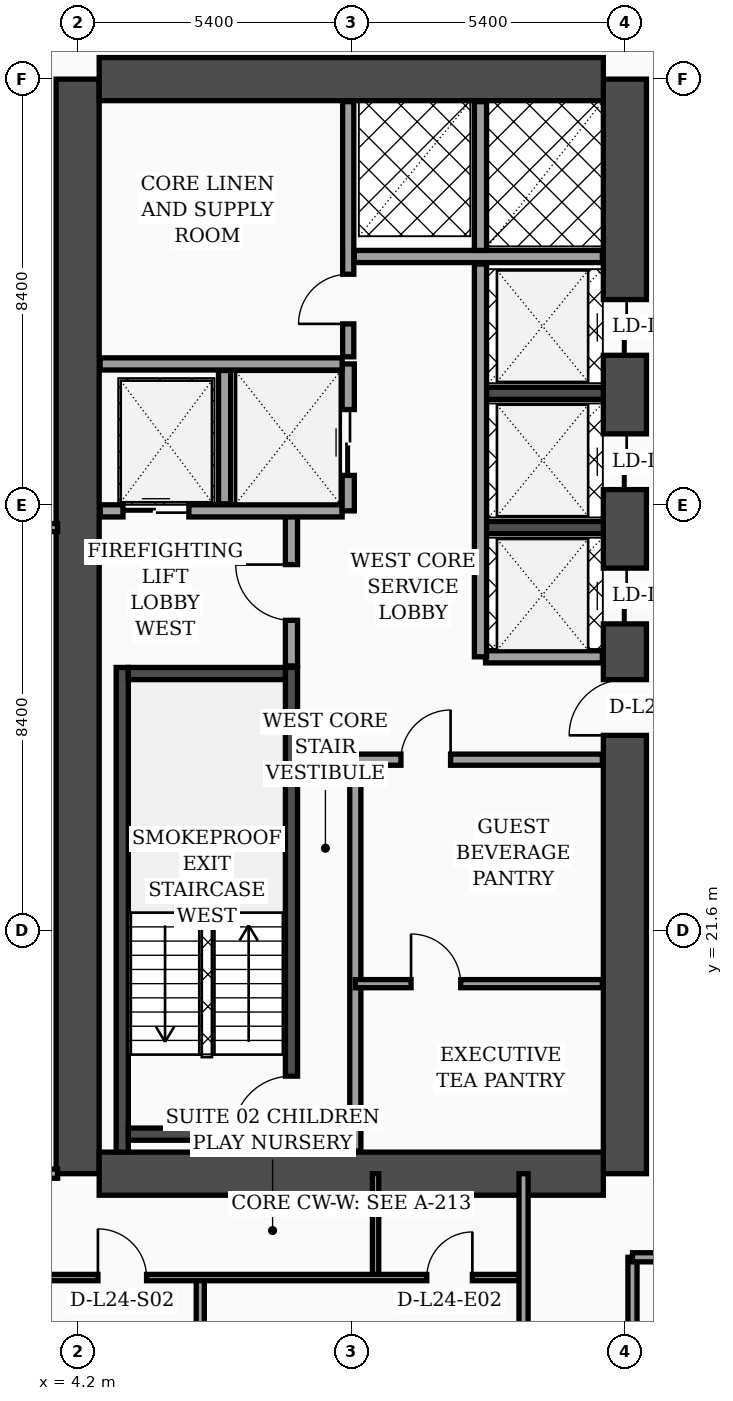
"""IFC4 building model, lengths in metres.
Left out: names, types, materials, properties, quantities, classifications, styles, units other than length and angle.
Written with IfcOpenShell. Run it as: python <this file> out.ifc"""

import sys

from ifc_helpers import new_model, si_unit, direction, frame, frame_2d, origin, place, context, subcontext, project, spatial, rectangle, extrude, element, fill, save


model = new_model("IFC4")
c1 = context("Model", 3, precision=1e-05, world=origin(), true_north=direction((0.0, 1.0)))
c2 = subcontext(c1, "Body", "Model", "MODEL_VIEW")
j1 = project(units=[si_unit("LENGTHUNIT", "METRE"), si_unit("PLANEANGLEUNIT", "RADIAN")], contexts=[c1])
p1 = place(None, origin())
s1 = spatial("IfcSite", under=j1, at=p1, CompositionType="ELEMENT")
p2 = place(p1, origin())
s2 = spatial("IfcBuilding", under=s1, at=p2, CompositionType="ELEMENT")
p3 = place(p2, frame((0.0, 0.0, 101.2)))
s3 = spatial("IfcBuildingStorey", under=s2, at=p3, CompositionType="ELEMENT", Elevation=101.2)
p4 = place(p3, frame((4.2, 16.8, 0.0), z_axis=(0.0, 0.0, 1.0), x_axis=(0.0, 1.0, 0.0)))
e1 = element("IfcWall", 1, at=p4, inside=s3, PredefinedType="SHEAR", context=c2, shape_type="SweptSolid", body=[
    extrude(rectangle(XDim=21.6, YDim=0.85, at=frame_2d((10.8, 0.0))), origin(), (0.0, 0.0, 1.0), 3.56),
])
p5 = place(p3, frame((15.0, 16.8, 0.0), z_axis=(0.0, 0.0, 1.0), x_axis=(0.0, 1.0, 0.0)))
e2 = element("IfcWall", 2, at=p5, inside=s3, PredefinedType="SHEAR", context=c2, shape_type="SweptSolid", body=[
    extrude(rectangle(XDim=21.6, YDim=0.85, at=frame_2d((10.8, 0.0))), origin(), (0.0, 0.0, 1.0), 3.56),
])
p6 = place(p5, frame((8.65, 0.0, 0.0)))
e3 = element("IfcOpeningElement", 3, at=p6, cuts=e2, PredefinedType="OPENING", context=c2, shape_type="SweptSolid", body=[
    extrude(rectangle(XDim=1.1, YDim=2.2, at=frame_2d((0.55, 1.1))), frame((0.0, 0.435, 0.0), z_axis=(0.0, -1.0, 0.0), x_axis=(1.0, 0.0, 0.0)), (0.0, 0.0, 1.0), 0.87),
])
p7 = place(p5, frame((10.85, 0.0, 0.0)))
e4 = element("IfcOpeningElement", 4, at=p7, cuts=e2, PredefinedType="OPENING", context=c2, shape_type="SweptSolid", body=[
    extrude(rectangle(XDim=1.1, YDim=2.2, at=frame_2d((0.55, 1.1))), frame((0.0, 0.435, 0.0), z_axis=(0.0, -1.0, 0.0), x_axis=(1.0, 0.0, 0.0)), (0.0, 0.0, 1.0), 0.87),
])
p8 = place(p5, frame((13.5, 0.0, 0.0)))
e5 = element("IfcOpeningElement", 5, at=p8, cuts=e2, PredefinedType="OPENING", context=c2, shape_type="SweptSolid", body=[
    extrude(rectangle(XDim=1.1, YDim=2.2, at=frame_2d((0.55, 1.1))), frame((0.0, 0.435, 0.0), z_axis=(0.0, -1.0, 0.0), x_axis=(1.0, 0.0, 0.0)), (0.0, 0.0, 1.0), 0.87),
])
p9 = place(p5, frame((16.15, 0.0, 0.0)))
e6 = element("IfcOpeningElement", 6, at=p9, cuts=e2, PredefinedType="OPENING", context=c2, shape_type="SweptSolid", body=[
    extrude(rectangle(XDim=1.1, YDim=2.2, at=frame_2d((0.55, 1.1))), frame((0.0, 0.435, 0.0), z_axis=(0.0, -1.0, 0.0), x_axis=(1.0, 0.0, 0.0)), (0.0, 0.0, 1.0), 0.87),
])
for number, where, z_axis, x_axis in (
    (7, (4.625, 38.4, 0.0), (0.0, 0.0, 1.0), (1.0, 0.0, 0.0)),
    (8, (4.625, 16.8, 0.0), (0.0, 0.0, 1.0), (1.0, 0.0, 0.0)),
):
    element("IfcWall", number, at=place(p3, frame(where, z_axis=z_axis, x_axis=x_axis)), inside=s3, PredefinedType="SHEAR", context=c2, shape_type="SweptSolid", body=[
        extrude(rectangle(XDim=9.95, YDim=0.85, at=frame_2d((4.975, 0.0))), origin(), (0.0, 0.0, 1.0), 3.56),
    ])
p10 = place(p3, frame((5.08, 17.225, 0.0), z_axis=(0.0, 0.0, 1.0), x_axis=(0.0, 1.0, 0.0)))
e9 = element("IfcWall", 9, at=p10, inside=s3, PredefinedType="SOLIDWALL", context=c2, shape_type="SweptSolid", body=[
    extrude(rectangle(XDim=9.565, YDim=0.24, at=frame_2d((4.782, 0.0))), origin(), (0.0, 0.0, 1.0), 3.56),
])
p11 = place(p3, frame((8.42, 17.225, 0.0), z_axis=(0.0, 0.0, 1.0), x_axis=(0.0, 1.0, 0.0)))
e10 = element("IfcWall", 10, at=p11, inside=s3, PredefinedType="SOLIDWALL", context=c2, shape_type="SweptSolid", body=[
    extrude(rectangle(XDim=9.565, YDim=0.24, at=frame_2d((4.782, 0.0))), origin(), (0.0, 0.0, 1.0), 3.56),
])
p12 = place(p11, frame((0.35, 0.0, 0.0)))
e11 = element("IfcOpeningElement", 11, at=p12, cuts=e10, PredefinedType="OPENING", context=c2, shape_type="SweptSolid", body=[
    extrude(rectangle(XDim=1.15, YDim=2.2, at=frame_2d((0.575, 1.1))), frame((0.0, 0.13, 0.0), z_axis=(0.0, -1.0, 0.0), x_axis=(1.0, 0.0, 0.0)), (0.0, 0.0, 1.0), 0.26),
])
for number, where, z_axis, x_axis in (
    (12, (5.2, 17.58, 0.0), (0.0, 0.0, 1.0), (1.0, 0.0, 0.0)),
    (13, (5.2, 26.67, 0.0), (0.0, 0.0, 1.0), (1.0, 0.0, 0.0)),
):
    element("IfcWall", number, at=place(p3, frame(where, z_axis=z_axis, x_axis=x_axis)), inside=s3, PredefinedType="SOLIDWALL", context=c2, shape_type="SweptSolid", body=[
        extrude(rectangle(XDim=3.1, YDim=0.24, at=frame_2d((1.55, 0.0))), origin(), (0.0, 0.0, 1.0), 3.56),
    ])
for number, where, z_axis, x_axis in (
    (14, (12.18, 29.55, 0.0), (0.0, 0.0, 1.0), (1.0, 0.0, 0.0)),
    (15, (12.18, 32.2, 0.0), (0.0, 0.0, 1.0), (1.0, 0.0, 0.0)),
):
    element("IfcWall", number, at=place(p3, frame(where, z_axis=z_axis, x_axis=x_axis)), inside=s3, PredefinedType="SOLIDWALL", context=c2, shape_type="SweptSolid", body=[
        extrude(rectangle(XDim=2.395, YDim=0.24, at=frame_2d((1.198, 0.0))), origin(), (0.0, 0.0, 1.0), 3.56),
    ])
p13 = place(p3, frame((8.42, 26.82, 0.0), z_axis=(0.0, 0.0, 1.0), x_axis=(0.0, 1.0, 0.0)))
e16 = element("IfcWall", 16, at=p13, inside=s3, PredefinedType="SOLIDWALL", context=c2, shape_type="SweptSolid", body=[
    extrude(rectangle(XDim=3.0, YDim=0.24, at=frame_2d((1.5, 0.0))), origin(), (0.0, 0.0, 1.0), 3.56),
])
p14 = place(p13, frame((0.9, 0.0, 0.0)))
e17 = element("IfcOpeningElement", 17, at=p14, cuts=e16, PredefinedType="OPENING", context=c2, shape_type="SweptSolid", body=[
    extrude(rectangle(XDim=1.1, YDim=2.2, at=frame_2d((0.55, 1.1))), frame((0.0, 0.13, 0.0), z_axis=(0.0, -1.0, 0.0), x_axis=(1.0, 0.0, 0.0)), (0.0, 0.0, 1.0), 0.26),
])
p15 = place(p3, frame((4.645, 29.88, 0.0), z_axis=(0.0, 0.0, 1.0), x_axis=(1.0, 0.0, 0.0)))
e18 = element("IfcWall", 18, at=p15, inside=s3, PredefinedType="SOLIDWALL", context=c2, shape_type="SweptSolid", body=[
    extrude(rectangle(XDim=4.775, YDim=0.24, at=frame_2d((2.387, 0.0))), origin(), (0.0, 0.0, 1.0), 3.56),
])
p16 = place(p15, frame((0.45, 0.0, 0.0)))
e19 = element("IfcOpeningElement", 19, at=p16, cuts=e18, PredefinedType="OPENING", context=c2, shape_type="SweptSolid", body=[
    extrude(rectangle(XDim=1.3, YDim=2.35, at=frame_2d((0.65, 1.175))), frame((0.0, 0.13, 0.0), z_axis=(0.0, -1.0, 0.0), x_axis=(1.0, 0.0, 0.0)), (0.0, 0.0, 1.0), 0.26),
])
p17 = place(p3, frame((7.1, 30.02, 0.0), z_axis=(0.0, 0.0, 1.0), x_axis=(0.0, 1.0, 0.0)))
e20 = element("IfcWall", 20, at=p17, inside=s3, PredefinedType="SOLIDWALL", context=c2, shape_type="SweptSolid", body=[
    extrude(rectangle(XDim=2.63, YDim=0.24, at=frame_2d((1.315, 0.0))), origin(), (0.0, 0.0, 1.0), 3.56),
])
p18 = place(p3, frame((9.54, 29.88, 0.0), z_axis=(0.0, 0.0, 1.0), x_axis=(0.0, 1.0, 0.0)))
e21 = element("IfcWall", 21, at=p18, inside=s3, PredefinedType="SOLIDWALL", context=c2, shape_type="SweptSolid", body=[
    extrude(rectangle(XDim=2.9, YDim=0.24, at=frame_2d((1.45, 0.0))), origin(), (0.0, 0.0, 1.0), 3.56),
])
p19 = place(p18, frame((0.7, 0.0, 0.0)))
e22 = element("IfcOpeningElement", 22, at=p19, cuts=e21, PredefinedType="OPENING", context=c2, shape_type="SweptSolid", body=[
    extrude(rectangle(XDim=1.3, YDim=2.35, at=frame_2d((0.65, 1.175))), frame((0.0, 0.13, 0.0), z_axis=(0.0, -1.0, 0.0), x_axis=(1.0, 0.0, 0.0)), (0.0, 0.0, 1.0), 0.26),
])
p20 = place(p3, frame((4.645, 32.78, 0.0), z_axis=(0.0, 0.0, 1.0), x_axis=(1.0, 0.0, 0.0)))
e23 = element("IfcWall", 23, at=p20, inside=s3, PredefinedType="SOLIDWALL", context=c2, shape_type="SweptSolid", body=[
    extrude(rectangle(XDim=4.775, YDim=0.24, at=frame_2d((2.387, 0.0))), origin(), (0.0, 0.0, 1.0), 3.19),
])
p21 = place(p3, frame((9.68, 17.245, 0.0), z_axis=(0.0, 0.0, 1.0), x_axis=(0.0, 1.0, 0.0)))
e24 = element("IfcWall", 24, at=p21, inside=s3, PredefinedType="SOLIDWALL", context=c2, shape_type="SweptSolid", body=[
    extrude(rectangle(XDim=7.755, YDim=0.22, at=frame_2d((3.877, 0.0))), origin(), (0.0, 0.0, 1.0), 3.56),
])
p22 = place(p3, frame((9.54, 32.92, 0.0), z_axis=(0.0, 0.0, 1.0), x_axis=(0.0, 1.0, 0.0)))
e25 = element("IfcWall", 25, at=p22, inside=s3, PredefinedType="SOLIDWALL", context=c2, shape_type="SweptSolid", body=[
    extrude(rectangle(XDim=5.035, YDim=0.22, at=frame_2d((2.518, 0.0))), origin(), (0.0, 0.0, 1.0), 3.56),
])
p23 = place(p22, frame((0.65, 0.0, 0.0)))
e26 = element("IfcOpeningElement", 26, at=p23, cuts=e25, PredefinedType="OPENING", context=c2, shape_type="SweptSolid", body=[
    extrude(rectangle(XDim=0.98, YDim=2.15, at=frame_2d((0.49, 1.075))), frame((0.0, 0.12, 0.0), z_axis=(0.0, -1.0, 0.0), x_axis=(1.0, 0.0, 0.0)), (0.0, 0.0, 1.0), 0.24),
])
p24 = place(p3, frame((9.68, 20.55, 0.0), z_axis=(0.0, 0.0, 1.0), x_axis=(1.0, 0.0, 0.0)))
e27 = element("IfcWall", 27, at=p24, inside=s3, PredefinedType="PARTITIONING", context=c2, shape_type="SweptSolid", body=[
    extrude(rectangle(XDim=4.875, YDim=0.16, at=frame_2d((2.438, 0.0))), origin(), (0.0, 0.0, 1.0), 3.56),
])
p25 = place(p24, frame((1.1, 0.0, 0.0)))
e28 = element("IfcOpeningElement", 28, at=p25, cuts=e27, PredefinedType="OPENING", context=c2, shape_type="SweptSolid", body=[
    extrude(rectangle(XDim=0.98, YDim=2.15, at=frame_2d((0.49, 1.075))), frame((0.0, 0.09, 0.0), z_axis=(0.0, -1.0, 0.0), x_axis=(1.0, 0.0, 0.0)), (0.0, 0.0, 1.0), 0.18),
])
p26 = place(p3, frame((9.68, 24.97, 0.0), z_axis=(0.0, 0.0, 1.0), x_axis=(1.0, 0.0, 0.0)))
e29 = element("IfcWall", 29, at=p26, inside=s3, PredefinedType="SOLIDWALL", context=c2, shape_type="SweptSolid", body=[
    extrude(rectangle(XDim=4.875, YDim=0.22, at=frame_2d((2.438, 0.0))), origin(), (0.0, 0.0, 1.0), 2.84),
])
p27 = place(p26, frame((0.9, 0.0, 0.0)))
e30 = element("IfcOpeningElement", 30, at=p27, cuts=e29, PredefinedType="OPENING", context=c2, shape_type="SweptSolid", body=[
    extrude(rectangle(XDim=0.98, YDim=2.15, at=frame_2d((0.49, 1.075))), frame((0.0, 0.12, 0.0), z_axis=(0.0, -1.0, 0.0), x_axis=(1.0, 0.0, 0.0)), (0.0, 0.0, 1.0), 0.24),
])
p28 = place(p3, frame((12.25, 27.0, 0.0), z_axis=(0.0, 0.0, 1.0), x_axis=(1.0, 0.0, 0.0)))
e31 = element("IfcWall", 31, at=p28, inside=s3, PredefinedType="SOLIDWALL", context=c2, shape_type="SweptSolid", body=[
    extrude(rectangle(XDim=2.305, YDim=0.24, at=frame_2d((1.152, 0.0))), origin(), (0.0, 0.0, 1.0), 3.56),
])
p29 = place(p3, frame((12.15, 27.0, 0.0), z_axis=(0.0, 0.0, 1.0), x_axis=(0.0, 1.0, 0.0)))
e32 = element("IfcWall", 32, at=p29, inside=s3, PredefinedType="SOLIDWALL", context=c2, shape_type="SweptSolid", body=[
    extrude(rectangle(XDim=7.75, YDim=0.24, at=frame_2d((3.875, 0.0))), origin(), (0.0, 0.0, 1.0), 3.56),
])
p30 = place(p3, frame((9.66, 34.9, 0.0), z_axis=(0.0, 0.0, 1.0), x_axis=(1.0, 0.0, 0.0)))
e33 = element("IfcWall", 33, at=p30, inside=s3, PredefinedType="SOLIDWALL", context=c2, shape_type="SweptSolid", body=[
    extrude(rectangle(XDim=4.895, YDim=0.24, at=frame_2d((2.448, 0.0))), origin(), (0.0, 0.0, 1.0), 3.56),
])
p31 = place(p3, frame((12.15, 35.02, 0.0), z_axis=(0.0, 0.0, 1.0), x_axis=(0.0, 1.0, 0.0)))
e34 = element("IfcWall", 34, at=p31, inside=s3, PredefinedType="SOLIDWALL", context=c2, shape_type="SweptSolid", body=[
    extrude(rectangle(XDim=2.935, YDim=0.24, at=frame_2d((1.468, 0.0))), origin(), (0.0, 0.0, 1.0), 3.56),
])
p32 = place(p3, frame((0.08, 29.55, 0.0), z_axis=(0.0, 0.0, 1.0), x_axis=(1.0, 0.0, 0.0)))
e35 = element("IfcWall", 35, at=p32, inside=s3, PredefinedType="PARTITIONING", context=c2, shape_type="SweptSolid", body=[
    extrude(rectangle(XDim=3.725, YDim=0.16, at=frame_2d((1.862, 0.0))), origin(), (0.0, 0.0, 1.0), 3.04),
])
p33 = place(p32, frame((1.35, 0.0, 0.0)))
e36 = element("IfcOpeningElement", 36, at=p33, cuts=e35, PredefinedType="OPENING", context=c2, shape_type="SweptSolid", body=[
    extrude(rectangle(XDim=0.96, YDim=2.2, at=frame_2d((0.48, 1.1))), frame((0.0, 0.09, 0.0), z_axis=(0.0, -1.0, 0.0), x_axis=(1.0, 0.0, 0.0)), (0.0, 0.0, 1.0), 0.18),
])
p34 = place(p3, frame((0.08, 16.8, 0.0), z_axis=(0.0, 0.0, 1.0), x_axis=(1.0, 0.0, 0.0)))
e37 = element("IfcWall", 37, at=p34, inside=s3, PredefinedType="PARTITIONING", context=c2, shape_type="SweptSolid", body=[
    extrude(rectangle(XDim=3.725, YDim=0.18, at=frame_2d((1.862, 0.0))), origin(), (0.0, 0.0, 1.0), 2.84),
])
p35 = place(p3, frame((10.08, 14.75, 0.0), z_axis=(0.0, 0.0, 1.0), x_axis=(0.0, 1.0, 0.0)))
e38 = element("IfcWall", 38, at=p35, inside=s3, PredefinedType="PARTITIONING", context=c2, shape_type="SweptSolid", body=[
    extrude(rectangle(XDim=2.05, YDim=0.125, at=frame_2d((1.025, 0.0))), origin(), (0.0, 0.0, 1.0), 3.56),
])
p36 = place(p3, frame((6.62, 9.5, 0.0), z_axis=(0.0, 0.0, 1.0), x_axis=(0.0, 1.0, 0.0)))
e39 = element("IfcWall", 39, at=p36, inside=s3, PredefinedType="PARTITIONING", context=c2, shape_type="SweptSolid", body=[
    extrude(rectangle(XDim=5.25, YDim=0.16, at=frame_2d((2.625, 0.0))), origin(), (0.0, 0.0, 1.0), 3.14),
])
p37 = place(p36, frame((2.15, 0.0, 0.0)))
e40 = element("IfcOpeningElement", 40, at=p37, cuts=e39, PredefinedType="OPENING", context=c2, shape_type="SweptSolid", body=[
    extrude(rectangle(XDim=0.96, YDim=2.2, at=frame_2d((0.48, 1.1))), frame((0.0, 0.09, 0.0), z_axis=(0.0, -1.0, 0.0), x_axis=(1.0, 0.0, 0.0)), (0.0, 0.0, 1.0), 0.18),
])
p38 = place(p3, frame((0.08, 14.75, 0.0), z_axis=(0.0, 0.0, 1.0), x_axis=(1.0, 0.0, 0.0)))
e41 = element("IfcWall", 41, at=p38, inside=s3, PredefinedType="PARTITIONING", context=c2, shape_type="SweptSolid", body=[
    extrude(rectangle(XDim=12.92, YDim=0.125, at=frame_2d((6.46, 0.0))), origin(), (0.0, 0.0, 1.0), 2.84),
])
p39 = place(p38, frame((4.52, 0.0, 0.0)))
e42 = element("IfcOpeningElement", 42, at=p39, cuts=e41, PredefinedType="OPENING", context=c2, shape_type="SweptSolid", body=[
    extrude(rectangle(XDim=0.96, YDim=2.2, at=frame_2d((0.48, 1.1))), frame((0.0, 0.073, 0.0), z_axis=(0.0, -1.0, 0.0), x_axis=(1.0, 0.0, 0.0)), (0.0, 0.0, 1.0), 0.145),
])
p40 = place(p38, frame((11.01, 0.0, 0.0)))
e43 = element("IfcOpeningElement", 43, at=p40, cuts=e41, PredefinedType="OPENING", context=c2, shape_type="SweptSolid", body=[
    extrude(rectangle(XDim=0.9, YDim=2.15, at=frame_2d((0.45, 1.075))), frame((0.0, 0.073, 0.0), z_axis=(0.0, -1.0, 0.0), x_axis=(1.0, 0.0, 0.0)), (0.0, 0.0, 1.0), 0.145),
])
p41 = place(p3, frame((13.0, 2.44, 0.0), z_axis=(0.0, 0.0, 1.0), x_axis=(0.0, 1.0, 0.0)))
e44 = element("IfcWall", 44, at=p41, inside=s3, PredefinedType="PARTITIONING", context=c2, shape_type="SweptSolid", body=[
    extrude(rectangle(XDim=14.36, YDim=0.18, at=frame_2d((7.18, 0.0))), origin(), (0.0, 0.0, 1.0), 2.84),
])
p42 = place(p41, frame((3.01, 0.0, 0.0)))
e45 = element("IfcOpeningElement", 45, at=p42, cuts=e44, PredefinedType="OPENING", context=c2, shape_type="SweptSolid", body=[
    extrude(rectangle(XDim=1.02, YDim=2.2, at=frame_2d((0.51, 1.1))), frame((0.0, 0.1, 0.0), z_axis=(0.0, -1.0, 0.0), x_axis=(1.0, 0.0, 0.0)), (0.0, 0.0, 1.0), 0.2),
])
p43 = place(p41, frame((9.18, 0.0, 0.0)))
e46 = element("IfcOpeningElement", 46, at=p43, cuts=e44, PredefinedType="OPENING", context=c2, shape_type="SweptSolid", body=[
    extrude(rectangle(XDim=1.02, YDim=2.2, at=frame_2d((0.51, 1.1))), frame((0.0, 0.1, 0.0), z_axis=(0.0, -1.0, 0.0), x_axis=(1.0, 0.0, 0.0)), (0.0, 0.0, 1.0), 0.2),
])
p44 = place(p3, frame((15.15, 2.44, 0.0), z_axis=(0.0, 0.0, 1.0), x_axis=(0.0, 1.0, 0.0)))
e47 = element("IfcWall", 47, at=p44, inside=s3, PredefinedType="PARTITIONING", context=c2, shape_type="SweptSolid", body=[
    extrude(rectangle(XDim=12.71, YDim=0.18, at=frame_2d((6.355, 0.0))), origin(), (0.0, 0.0, 1.0), 3.04),
])
p45 = place(p3, frame((15.15, 15.15, 0.0), z_axis=(0.0, 0.0, 1.0), x_axis=(1.0, 0.0, 0.0)))
e48 = element("IfcWall", 48, at=p45, inside=s3, PredefinedType="PARTITIONING", context=c2, shape_type="SweptSolid", body=[
    extrude(rectangle(XDim=6.45, YDim=0.18, at=frame_2d((3.225, 0.0))), origin(), (0.0, 0.0, 1.0), 2.49),
])
p46 = place(p45, frame((1.74, 0.0, 0.0)))
e49 = element("IfcOpeningElement", 49, at=p46, cuts=e48, PredefinedType="OPENING", context=c2, shape_type="SweptSolid", body=[
    extrude(rectangle(XDim=1.02, YDim=2.2, at=frame_2d((0.51, 1.1))), frame((0.0, 0.1, 0.0), z_axis=(0.0, -1.0, 0.0), x_axis=(1.0, 0.0, 0.0)), (0.0, 0.0, 1.0), 0.2),
])
p47 = place(p14, origin())
e50 = element("IfcDoor", 50, at=p47, inside=s3, OperationType="SINGLE_SWING_RIGHT", PredefinedType="DOOR", context=c2, shape_type="SweptSolid", body=[
    extrude(rectangle(XDim=1.1, YDim=2.2, at=frame_2d((0.55, 1.1))), frame((0.0, 0.025, 0.0), z_axis=(0.0, -1.0, 0.0), x_axis=(1.0, 0.0, 0.0)), (0.0, 0.0, 1.0), 0.05),
])
fill(e17, e50)
p48 = place(p16, origin())
e51 = element("IfcDoor", 51, at=p48, inside=s3, OperationType="DOUBLE_DOOR_SLIDING", PredefinedType="DOOR", context=c2, shape_type="SweptSolid", body=[
    extrude(rectangle(XDim=1.3, YDim=2.35, at=frame_2d((0.65, 1.175))), frame((0.0, 0.025, 0.0), z_axis=(0.0, -1.0, 0.0), x_axis=(1.0, 0.0, 0.0)), (0.0, 0.0, 1.0), 0.05),
])
fill(e19, e51)
p49 = place(p19, origin())
e52 = element("IfcDoor", 52, at=p49, inside=s3, OperationType="DOUBLE_DOOR_SLIDING", PredefinedType="DOOR", context=c2, shape_type="SweptSolid", body=[
    extrude(rectangle(XDim=1.3, YDim=2.35, at=frame_2d((0.65, 1.175))), frame((0.0, 0.025, 0.0), z_axis=(0.0, -1.0, 0.0), x_axis=(1.0, 0.0, 0.0)), (0.0, 0.0, 1.0), 0.05),
])
fill(e22, e52)
p50 = place(p23, origin())
e53 = element("IfcDoor", 53, at=p50, inside=s3, OperationType="SINGLE_SWING_LEFT", PredefinedType="DOOR", context=c2, shape_type="SweptSolid", body=[
    extrude(rectangle(XDim=0.98, YDim=2.15, at=frame_2d((0.49, 1.075))), frame((0.0, 0.025, 0.0), z_axis=(0.0, -1.0, 0.0), x_axis=(1.0, 0.0, 0.0)), (0.0, 0.0, 1.0), 0.05),
])
fill(e26, e53)
p51 = place(p25, origin())
e54 = element("IfcDoor", 54, at=p51, inside=s3, OperationType="SINGLE_SWING_LEFT", PredefinedType="DOOR", context=c2, shape_type="SweptSolid", body=[
    extrude(rectangle(XDim=0.98, YDim=2.15, at=frame_2d((0.49, 1.075))), frame((0.0, 0.025, 0.0), z_axis=(0.0, -1.0, 0.0), x_axis=(1.0, 0.0, 0.0)), (0.0, 0.0, 1.0), 0.05),
])
fill(e28, e54)
p52 = place(p27, origin())
e55 = element("IfcDoor", 55, at=p52, inside=s3, OperationType="SINGLE_SWING_RIGHT", PredefinedType="DOOR", context=c2, shape_type="SweptSolid", body=[
    extrude(rectangle(XDim=0.98, YDim=2.15, at=frame_2d((0.49, 1.075))), frame((0.0, 0.025, 0.0), z_axis=(0.0, -1.0, 0.0), x_axis=(1.0, 0.0, 0.0)), (0.0, 0.0, 1.0), 0.05),
])
fill(e30, e55)
p53 = place(p39, origin())
e56 = element("IfcDoor", 56, at=p53, inside=s3, OperationType="SINGLE_SWING_LEFT", PredefinedType="DOOR", context=c2, shape_type="SweptSolid", body=[
    extrude(rectangle(XDim=0.96, YDim=2.2, at=frame_2d((0.48, 1.1))), frame((0.0, 0.025, 0.0), z_axis=(0.0, -1.0, 0.0), x_axis=(1.0, 0.0, 0.0)), (0.0, 0.0, 1.0), 0.05),
])
fill(e42, e56)
p54 = place(p40, origin())
e57 = element("IfcDoor", 57, at=p54, inside=s3, OperationType="SINGLE_SWING_RIGHT", PredefinedType="DOOR", context=c2, shape_type="SweptSolid", body=[
    extrude(rectangle(XDim=0.9, YDim=2.15, at=frame_2d((0.45, 1.075))), frame((0.0, 0.025, 0.0), z_axis=(0.0, -1.0, 0.0), x_axis=(1.0, 0.0, 0.0)), (0.0, 0.0, 1.0), 0.05),
])
fill(e43, e57)
p55 = place(p12, origin())
e58 = element("IfcDoor", 58, at=p55, inside=s3, OperationType="SINGLE_SWING_LEFT", PredefinedType="DOOR", context=c2, shape_type="SweptSolid", body=[
    extrude(rectangle(XDim=1.15, YDim=2.2, at=frame_2d((0.575, 1.1))), frame((0.0, 0.025, 0.0), z_axis=(0.0, -1.0, 0.0), x_axis=(1.0, 0.0, 0.0)), (0.0, 0.0, 1.0), 0.05),
])
fill(e11, e58)
p56 = place(p6, origin())
e59 = element("IfcDoor", 59, at=p56, inside=s3, OperationType="SINGLE_SWING_LEFT", PredefinedType="DOOR", context=c2, shape_type="SweptSolid", body=[
    extrude(rectangle(XDim=1.1, YDim=2.2, at=frame_2d((0.55, 1.1))), frame((0.0, 0.025, 0.0), z_axis=(0.0, -1.0, 0.0), x_axis=(1.0, 0.0, 0.0)), (0.0, 0.0, 1.0), 0.05),
])
fill(e3, e59)
p57 = place(p7, origin())
e60 = element("IfcDoor", 60, at=p57, inside=s3, OperationType="DOUBLE_DOOR_SLIDING", PredefinedType="DOOR", context=c2, shape_type="SweptSolid", body=[
    extrude(rectangle(XDim=1.1, YDim=2.2, at=frame_2d((0.55, 1.1))), frame((0.0, 0.025, 0.0), z_axis=(0.0, -1.0, 0.0), x_axis=(1.0, 0.0, 0.0)), (0.0, 0.0, 1.0), 0.05),
])
fill(e4, e60)
p58 = place(p8, origin())
e61 = element("IfcDoor", 61, at=p58, inside=s3, OperationType="DOUBLE_DOOR_SLIDING", PredefinedType="DOOR", context=c2, shape_type="SweptSolid", body=[
    extrude(rectangle(XDim=1.1, YDim=2.2, at=frame_2d((0.55, 1.1))), frame((0.0, 0.025, 0.0), z_axis=(0.0, -1.0, 0.0), x_axis=(1.0, 0.0, 0.0)), (0.0, 0.0, 1.0), 0.05),
])
fill(e5, e61)
p59 = place(p9, origin())
e62 = element("IfcDoor", 62, at=p59, inside=s3, OperationType="DOUBLE_DOOR_SLIDING", PredefinedType="DOOR", context=c2, shape_type="SweptSolid", body=[
    extrude(rectangle(XDim=1.1, YDim=2.2, at=frame_2d((0.55, 1.1))), frame((0.0, 0.025, 0.0), z_axis=(0.0, -1.0, 0.0), x_axis=(1.0, 0.0, 0.0)), (0.0, 0.0, 1.0), 0.05),
])
fill(e6, e62)
save(model, sys.argv[1])
